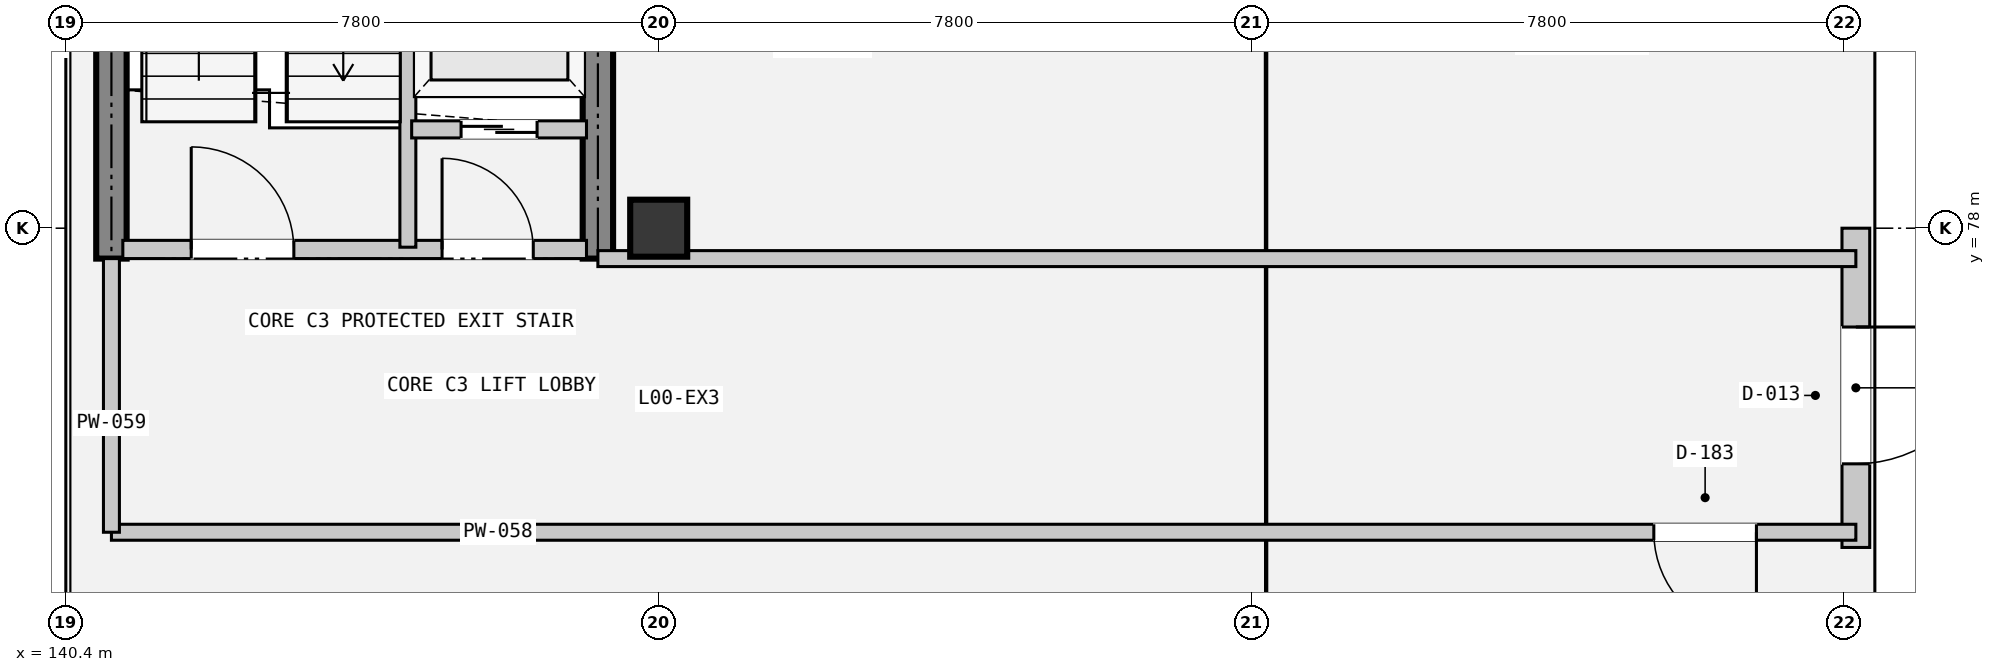
"""IFC4 building model, lengths in metres.
Left out: names, types, materials, properties, quantities, classifications, styles, units other than length and angle.
Written with IfcOpenShell. Run it as: python <this file> out.ifc"""

import sys

from ifc_helpers import new_model, si_unit, direction, frame, frame_2d, origin, origin_2d, place, context, subcontext, project, spatial, rectangle, extrude, element, fill, save


model = new_model("IFC4")
c1 = context("Model", 3, precision=1e-05, world=origin(), true_north=direction((0.0, 1.0)))
c2 = subcontext(c1, "Body", "Model", "MODEL_VIEW")
j1 = project(units=[si_unit("LENGTHUNIT", "METRE"), si_unit("PLANEANGLEUNIT", "RADIAN")], contexts=[c1])
p1 = place(None, origin())
s1 = spatial("IfcSite", under=j1, at=p1, CompositionType="ELEMENT")
p2 = place(p1, origin())
s2 = spatial("IfcBuilding", under=s1, at=p2, CompositionType="ELEMENT")
p3 = place(p2, origin())
s3 = spatial("IfcBuildingStorey", under=s2, at=p3, CompositionType="ELEMENT", Elevation=0.0)
p4 = place(p3, frame((148.2, 78.0, 0.0), z_axis=(0.0, 0.0, 1.0), x_axis=(1.0, 0.0, 0.0)))
e1 = element("IfcColumn", 1, at=p4, inside=s3, PredefinedType="COLUMN", context=c2, shape_type="SweptSolid", body=[
    extrude(rectangle(XDim=0.75, YDim=0.75, at=origin_2d()), origin(), (0.0, 0.0, 1.0), 5.4),
])
for number, where, z_axis, x_axis in (
    (2, (141.0, 77.6, 0.0), (0.0, 0.0, 1.0), (0.0, 1.0, 0.0)),
    (3, (147.4, 77.6, 0.0), (0.0, 0.0, 1.0), (0.0, 1.0, 0.0)),
):
    element("IfcWall", number, at=place(p3, frame(where, z_axis=z_axis, x_axis=x_axis)), inside=s3, PredefinedType="SHEAR", context=c2, shape_type="SweptSolid", body=[
        extrude(rectangle(XDim=8.6, YDim=0.4, at=frame_2d((4.3, 0.0))), origin(), (0.0, 0.0, 1.0), 5.4),
    ])
p5 = place(p3, frame((163.95, 78.0, 0.0), z_axis=(0.0, 0.0, 1.0), x_axis=(0.0, -1.0, 0.0)))
e4 = element("IfcWall", 4, at=p5, inside=s3, PredefinedType="SOLIDWALL", context=c2, shape_type="SweptSolid", body=[
    extrude(rectangle(XDim=4.2, YDim=0.365, at=frame_2d((2.1, 0.0))), origin(), (0.0, 0.0, 1.0), 4.46),
])
p6 = place(p5, frame((1.3, 0.0, 0.0)))
e5 = element("IfcOpeningElement", 5, at=p6, cuts=e4, PredefinedType="OPENING", context=c2, shape_type="SweptSolid", body=[
    extrude(rectangle(XDim=1.8, YDim=2.4, at=frame_2d((0.9, 1.2))), frame((0.0, 0.192, 0.0), z_axis=(0.0, -1.0, 0.0), x_axis=(1.0, 0.0, 0.0)), (0.0, 0.0, 1.0), 0.385),
])
p7 = place(p3, frame((141.15, 77.72, 0.0), z_axis=(0.0, 0.0, 1.0), x_axis=(1.0, 0.0, 0.0)))
e6 = element("IfcWall", 6, at=p7, inside=s3, PredefinedType="PARTITIONING", context=c2, shape_type="SweptSolid", body=[
    extrude(rectangle(XDim=6.1, YDim=0.24, at=frame_2d((3.05, 0.0))), origin(), (0.0, 0.0, 1.0), 4.46),
])
p8 = place(p7, frame((0.9, 0.0, 0.0)))
e7 = element("IfcOpeningElement", 7, at=p8, cuts=e6, PredefinedType="OPENING", context=c2, shape_type="SweptSolid", body=[
    extrude(rectangle(XDim=1.35, YDim=2.2, at=frame_2d((0.675, 1.1))), frame((0.0, 0.13, 0.0), z_axis=(0.0, -1.0, 0.0), x_axis=(1.0, 0.0, 0.0)), (0.0, 0.0, 1.0), 0.26),
])
p9 = place(p7, frame((4.2, 0.0, 0.0)))
e8 = element("IfcOpeningElement", 8, at=p9, cuts=e6, PredefinedType="OPENING", context=c2, shape_type="SweptSolid", body=[
    extrude(rectangle(XDim=1.2, YDim=2.2, at=frame_2d((0.6, 1.1))), frame((0.0, 0.13, 0.0), z_axis=(0.0, -1.0, 0.0), x_axis=(1.0, 0.0, 0.0)), (0.0, 0.0, 1.0), 0.26),
])
p10 = place(p3, frame((144.9, 77.75, 0.0), z_axis=(0.0, 0.0, 1.0), x_axis=(0.0, 1.0, 0.0)))
e9 = element("IfcWall", 9, at=p10, inside=s3, PredefinedType="PARTITIONING", context=c2, shape_type="SweptSolid", body=[
    extrude(rectangle(XDim=8.3, YDim=0.21, at=frame_2d((4.15, 0.0))), origin(), (0.0, 0.0, 1.0), 4.46),
])
p11 = place(p3, frame((144.95, 79.3, 0.0), z_axis=(0.0, 0.0, 1.0), x_axis=(1.0, 0.0, 0.0)))
e10 = element("IfcWall", 10, at=p11, inside=s3, PredefinedType="PARTITIONING", context=c2, shape_type="SweptSolid", body=[
    extrude(rectangle(XDim=2.3, YDim=0.225, at=frame_2d((1.15, 0.0))), origin(), (0.0, 0.0, 1.0), 4.46),
])
p12 = place(p11, frame((0.65, 0.0, 0.0)))
e11 = element("IfcOpeningElement", 11, at=p12, cuts=e10, PredefinedType="OPENING", context=c2, shape_type="SweptSolid", body=[
    extrude(rectangle(XDim=1.0, YDim=2.15, at=frame_2d((0.5, 1.075))), frame((0.0, 0.123, 0.0), z_axis=(0.0, -1.0, 0.0), x_axis=(1.0, 0.0, 0.0)), (0.0, 0.0, 1.0), 0.245),
])
p13 = place(p3, frame((163.95, 74.0, 0.0), z_axis=(0.0, 0.0, 1.0), x_axis=(-1.0, 0.0, 0.0)))
e12 = element("IfcWall", 12, at=p13, inside=s3, PredefinedType="PARTITIONING", context=c2, shape_type="SweptSolid", body=[
    extrude(rectangle(XDim=22.95, YDim=0.21, at=frame_2d((11.475, 0.0))), origin(), (0.0, 0.0, 1.0), 3.45),
])
p14 = place(p13, frame((1.308, 0.0, 0.0)))
e13 = element("IfcOpeningElement", 13, at=p14, cuts=e12, PredefinedType="OPENING", context=c2, shape_type="SweptSolid", body=[
    extrude(rectangle(XDim=1.35, YDim=2.2, at=frame_2d((0.675, 1.1))), frame((0.0, 0.115, 0.0), z_axis=(0.0, -1.0, 0.0), x_axis=(1.0, 0.0, 0.0)), (0.0, 0.0, 1.0), 0.23),
])
p15 = place(p3, frame((141.0, 77.6, 0.0), z_axis=(0.0, 0.0, 1.0), x_axis=(0.0, -1.0, 0.0)))
e14 = element("IfcWall", 14, at=p15, inside=s3, PredefinedType="PARTITIONING", context=c2, shape_type="SweptSolid", body=[
    extrude(rectangle(XDim=3.6, YDim=0.21, at=frame_2d((1.8, 0.0))), origin(), (0.0, 0.0, 1.0), 3.45),
])
p16 = place(p3, frame((147.4, 77.6, 0.0), z_axis=(0.0, 0.0, 1.0), x_axis=(1.0, 0.0, 0.0)))
e15 = element("IfcWall", 15, at=p16, inside=s3, PredefinedType="PARTITIONING", context=c2, shape_type="SweptSolid", body=[
    extrude(rectangle(XDim=16.55, YDim=0.21, at=frame_2d((8.275, 0.0))), origin(), (0.0, 0.0, 1.0), 3.45),
])
p17 = place(p6, origin())
e16 = element("IfcDoor", 16, at=p17, inside=s3, OperationType="DOUBLE_DOOR_SINGLE_SWING", PredefinedType="DOOR", context=c2, shape_type="SweptSolid", body=[
    extrude(rectangle(XDim=1.8, YDim=2.4, at=frame_2d((0.9, 1.2))), frame((0.0, 0.025, 0.0), z_axis=(0.0, -1.0, 0.0), x_axis=(1.0, 0.0, 0.0)), (0.0, 0.0, 1.0), 0.05),
])
fill(e5, e16)
p18 = place(p8, origin())
e17 = element("IfcDoor", 17, at=p18, inside=s3, OperationType="SINGLE_SWING_RIGHT", PredefinedType="DOOR", context=c2, shape_type="SweptSolid", body=[
    extrude(rectangle(XDim=1.35, YDim=2.2, at=frame_2d((0.675, 1.1))), frame((0.0, 0.025, 0.0), z_axis=(0.0, -1.0, 0.0), x_axis=(1.0, 0.0, 0.0)), (0.0, 0.0, 1.0), 0.05),
])
fill(e7, e17)
p19 = place(p9, origin())
e18 = element("IfcDoor", 18, at=p19, inside=s3, OperationType="SINGLE_SWING_LEFT", PredefinedType="DOOR", context=c2, shape_type="SweptSolid", body=[
    extrude(rectangle(XDim=1.2, YDim=2.2, at=frame_2d((0.6, 1.1))), frame((0.0, 0.025, 0.0), z_axis=(0.0, -1.0, 0.0), x_axis=(1.0, 0.0, 0.0)), (0.0, 0.0, 1.0), 0.05),
])
fill(e8, e18)
p20 = place(p12, origin())
e19 = element("IfcDoor", 19, at=p20, inside=s3, OperationType="SLIDING_TO_RIGHT", PredefinedType="DOOR", context=c2, shape_type="SweptSolid", body=[
    extrude(rectangle(XDim=1.0, YDim=2.15, at=frame_2d((0.5, 1.075))), frame((0.0, 0.025, 0.0), z_axis=(0.0, -1.0, 0.0), x_axis=(1.0, 0.0, 0.0)), (0.0, 0.0, 1.0), 0.05),
])
fill(e11, e19)
p21 = place(p14, origin())
e20 = element("IfcDoor", 20, at=p21, inside=s3, OperationType="SINGLE_SWING_RIGHT", PredefinedType="DOOR", context=c2, shape_type="SweptSolid", body=[
    extrude(rectangle(XDim=1.35, YDim=2.2, at=frame_2d((0.675, 1.1))), frame((0.0, 0.025, 0.0), z_axis=(0.0, -1.0, 0.0), x_axis=(1.0, 0.0, 0.0)), (0.0, 0.0, 1.0), 0.05),
])
fill(e13, e20)
save(model, sys.argv[1])
